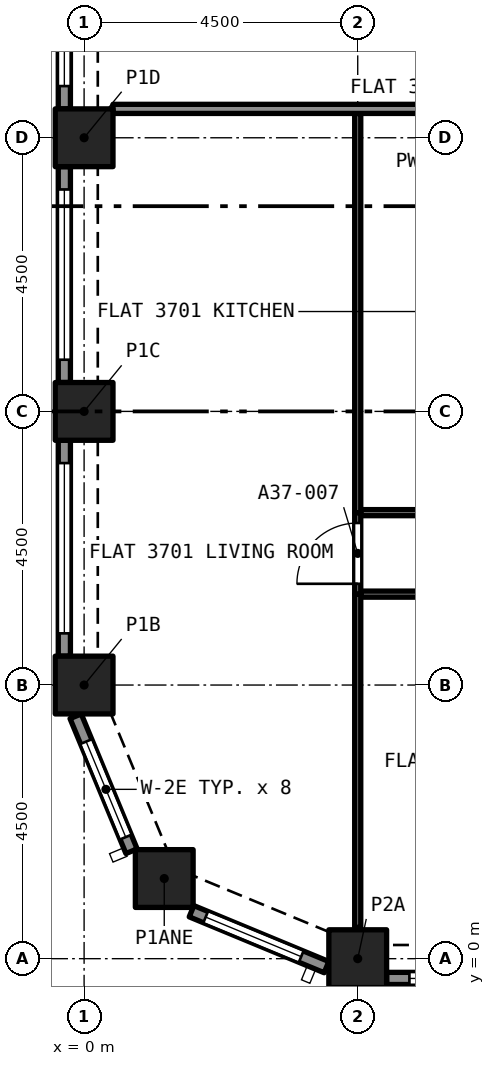
"""IFC4 building model, lengths in metres.
Left out: names, types, materials, properties, quantities, classifications, styles, units other than length and angle.
Written with IfcOpenShell. Run it as: python <this file> out.ifc"""

import sys

from ifc_helpers import new_model, si_unit, direction, frame, frame_2d, origin, origin_2d, place, context, subcontext, project, spatial, rectangle, extrude, element, fill, save


model = new_model("IFC4")
c1 = context("Model", 3, precision=1e-05, world=origin(), true_north=direction((0.0, 1.0)))
c2 = subcontext(c1, "Body", "Model", "MODEL_VIEW")
j1 = project(units=[si_unit("LENGTHUNIT", "METRE"), si_unit("PLANEANGLEUNIT", "RADIAN")], contexts=[c1])
p1 = place(None, origin())
s1 = spatial("IfcSite", under=j1, at=p1, CompositionType="ELEMENT")
p2 = place(p1, origin())
s2 = spatial("IfcBuilding", under=s1, at=p2, CompositionType="ELEMENT")
p3 = place(p2, frame((0.0, 0.0, 133.4)))
s3 = spatial("IfcBuildingStorey", under=s2, at=p3, CompositionType="ELEMENT", Elevation=133.4)
for number, where, z_axis, x_axis in (
    (1, (4.5, 0.0, 0.0), (0.0, 0.0, 1.0), (1.0, 0.0, 0.0)),
    (2, (1.318, 1.318, 0.0), (0.0, 0.0, 1.0), (1.0, 0.0, 0.0)),
    (3, (0.0, 4.5, 0.0), (0.0, 0.0, 1.0), (1.0, 0.0, 0.0)),
    (4, (0.0, 9.0, 0.0), (0.0, 0.0, 1.0), (1.0, 0.0, 0.0)),
    (5, (0.0, 13.5, 0.0), (0.0, 0.0, 1.0), (1.0, 0.0, 0.0)),
):
    element("IfcColumn", number, at=place(p3, frame(where, z_axis=z_axis, x_axis=x_axis)), inside=s3, PredefinedType="COLUMN", context=c2, shape_type="SweptSolid", body=[
        extrude(rectangle(XDim=0.95, YDim=0.95, at=origin_2d()), origin(), (0.0, 0.0, 1.0), 3.2),
    ])
p4 = place(p3, frame((0.78, 1.767, 0.0), z_axis=(0.0, 0.0, 1.0), x_axis=(-0.382680855588, 0.923880599843, 0.0)))
e6 = element("IfcWall", 6, at=p4, inside=s3, PredefinedType="SOLIDWALL", context=c2, shape_type="SweptSolid", body=[
    extrude(rectangle(XDim=2.403, YDim=0.2, at=frame_2d((1.201, 0.0))), origin(), (0.0, 0.0, 1.0), 3.2),
])
p5 = place(p4, frame((0.251, 0.0, 0.45)))
e7 = element("IfcOpeningElement", 7, at=p5, cuts=e6, PredefinedType="OPENING", context=c2, shape_type="SweptSolid", body=[
    extrude(rectangle(XDim=1.7, YDim=1.95, at=frame_2d((0.85, 0.975))), frame((0.0, 0.11, 0.0), z_axis=(0.0, -1.0, 0.0), x_axis=(1.0, 0.0, 0.0)), (0.0, 0.0, 1.0), 0.22),
])
p6 = place(p3, frame((3.987, -0.139, 0.0), z_axis=(0.0, 0.0, 1.0), x_axis=(-0.923880599843, 0.382680855588, 0.0)))
e8 = element("IfcWall", 8, at=p6, inside=s3, PredefinedType="SOLIDWALL", context=c2, shape_type="SweptSolid", body=[
    extrude(rectangle(XDim=2.403, YDim=0.2, at=frame_2d((1.201, 0.0))), origin(), (0.0, 0.0, 1.0), 3.2),
])
p7 = place(p6, frame((0.451, 0.0, 0.45)))
e9 = element("IfcOpeningElement", 9, at=p7, cuts=e8, PredefinedType="OPENING", context=c2, shape_type="SweptSolid", body=[
    extrude(rectangle(XDim=1.7, YDim=1.95, at=frame_2d((0.85, 0.975))), frame((0.0, 0.11, 0.0), z_axis=(0.0, -1.0, 0.0), x_axis=(1.0, 0.0, 0.0)), (0.0, 0.0, 1.0), 0.22),
])
p8 = place(p3, frame((8.525, -0.325, 0.0), z_axis=(0.0, 0.0, 1.0), x_axis=(-1.0, 0.0, 0.0)))
e10 = element("IfcWall", 10, at=p8, inside=s3, PredefinedType="SOLIDWALL", context=c2, shape_type="SweptSolid", body=[
    extrude(rectangle(XDim=3.55, YDim=0.2, at=frame_2d((1.775, 0.0))), origin(), (0.0, 0.0, 1.0), 3.2),
])
p9 = place(p8, frame((0.375, 0.0, 0.45)))
e11 = element("IfcOpeningElement", 11, at=p9, cuts=e10, PredefinedType="OPENING", context=c2, shape_type="SweptSolid", body=[
    extrude(rectangle(XDim=2.8, YDim=1.95, at=frame_2d((1.4, 0.975))), frame((0.0, 0.11, 0.0), z_axis=(0.0, -1.0, 0.0), x_axis=(1.0, 0.0, 0.0)), (0.0, 0.0, 1.0), 0.22),
])
p10 = place(p3, frame((-0.325, 13.975, 0.0), z_axis=(0.0, 0.0, 1.0), x_axis=(0.0, 1.0, 0.0)))
e12 = element("IfcWall", 12, at=p10, inside=s3, PredefinedType="SOLIDWALL", context=c2, shape_type="SweptSolid", body=[
    extrude(rectangle(XDim=3.55, YDim=0.2, at=frame_2d((1.775, 0.0))), origin(), (0.0, 0.0, 1.0), 3.2),
])
p11 = place(p10, frame((0.375, 0.0, 0.45)))
e13 = element("IfcOpeningElement", 13, at=p11, cuts=e12, PredefinedType="OPENING", context=c2, shape_type="SweptSolid", body=[
    extrude(rectangle(XDim=2.8, YDim=1.95, at=frame_2d((1.4, 0.975))), frame((0.0, 0.11, 0.0), z_axis=(0.0, -1.0, 0.0), x_axis=(1.0, 0.0, 0.0)), (0.0, 0.0, 1.0), 0.22),
])
p12 = place(p3, frame((-0.325, 9.475, 0.0), z_axis=(0.0, 0.0, 1.0), x_axis=(0.0, 1.0, 0.0)))
e14 = element("IfcWall", 14, at=p12, inside=s3, PredefinedType="SOLIDWALL", context=c2, shape_type="SweptSolid", body=[
    extrude(rectangle(XDim=3.55, YDim=0.2, at=frame_2d((1.775, 0.0))), origin(), (0.0, 0.0, 1.0), 3.2),
])
p13 = place(p12, frame((0.375, 0.0, 0.45)))
e15 = element("IfcOpeningElement", 15, at=p13, cuts=e14, PredefinedType="OPENING", context=c2, shape_type="SweptSolid", body=[
    extrude(rectangle(XDim=2.8, YDim=1.95, at=frame_2d((1.4, 0.975))), frame((0.0, 0.11, 0.0), z_axis=(0.0, -1.0, 0.0), x_axis=(1.0, 0.0, 0.0)), (0.0, 0.0, 1.0), 0.22),
])
p14 = place(p3, frame((-0.325, 4.975, 0.0), z_axis=(0.0, 0.0, 1.0), x_axis=(0.0, 1.0, 0.0)))
e16 = element("IfcWall", 16, at=p14, inside=s3, PredefinedType="SOLIDWALL", context=c2, shape_type="SweptSolid", body=[
    extrude(rectangle(XDim=3.55, YDim=0.2, at=frame_2d((1.775, 0.0))), origin(), (0.0, 0.0, 1.0), 3.2),
])
p15 = place(p14, frame((0.375, 0.0, 0.45)))
e17 = element("IfcOpeningElement", 17, at=p15, cuts=e16, PredefinedType="OPENING", context=c2, shape_type="SweptSolid", body=[
    extrude(rectangle(XDim=2.8, YDim=1.95, at=frame_2d((1.4, 0.975))), frame((0.0, 0.11, 0.0), z_axis=(0.0, -1.0, 0.0), x_axis=(1.0, 0.0, 0.0)), (0.0, 0.0, 1.0), 0.22),
])
p16 = place(p3, frame((9.0, 5.995, 0.0), z_axis=(0.0, 0.0, 1.0), x_axis=(-1.0, 0.0, 0.0)))
e18 = element("IfcWall", 18, at=p16, inside=s3, PredefinedType="PARTITIONING", context=c2, shape_type="SweptSolid", body=[
    extrude(rectangle(XDim=4.45, YDim=0.1, at=frame_2d((2.225, 0.0))), origin(), (0.0, 0.0, 1.0), 2.9),
])
p17 = place(p16, frame((1.8, 0.0, 0.0)))
e19 = element("IfcOpeningElement", 19, at=p17, cuts=e18, PredefinedType="OPENING", context=c2, shape_type="SweptSolid", body=[
    extrude(rectangle(XDim=0.9, YDim=2.1, at=frame_2d((0.45, 1.05))), frame((0.0, 0.06, 0.0), z_axis=(0.0, -1.0, 0.0), x_axis=(1.0, 0.0, 0.0)), (0.0, 0.0, 1.0), 0.12),
])
p18 = place(p3, frame((4.5, 0.514, 0.0), z_axis=(0.0, 0.0, 1.0), x_axis=(0.0, 1.0, 0.0)))
e20 = element("IfcWall", 20, at=p18, inside=s3, PredefinedType="PARTITIONING", context=c2, shape_type="SweptSolid", body=[
    extrude(rectangle(XDim=5.481, YDim=0.1, at=frame_2d((2.74, 0.0))), origin(), (0.0, 0.0, 1.0), 2.9),
])
p19 = place(p3, frame((4.55, 7.335, 0.0), z_axis=(0.0, 0.0, 1.0), x_axis=(1.0, 0.0, 0.0)))
e21 = element("IfcWall", 21, at=p19, inside=s3, PredefinedType="PARTITIONING", context=c2, shape_type="SweptSolid", body=[
    extrude(rectangle(XDim=3.12, YDim=0.1, at=frame_2d((1.56, 0.0))), origin(), (0.0, 0.0, 1.0), 2.9),
])
p20 = place(p19, frame((1.085, 0.0, 0.0)))
e22 = element("IfcOpeningElement", 22, at=p20, cuts=e21, PredefinedType="OPENING", context=c2, shape_type="SweptSolid", body=[
    extrude(rectangle(XDim=0.9, YDim=2.1, at=frame_2d((0.45, 1.05))), frame((0.0, 0.06, 0.0), z_axis=(0.0, -1.0, 0.0), x_axis=(1.0, 0.0, 0.0)), (0.0, 0.0, 1.0), 0.12),
])
p21 = place(p3, frame((4.5, 5.995, 0.0), z_axis=(0.0, 0.0, 1.0), x_axis=(0.0, 1.0, 0.0)))
e23 = element("IfcWall", 23, at=p21, inside=s3, PredefinedType="PARTITIONING", context=c2, shape_type="SweptSolid", body=[
    extrude(rectangle(XDim=1.34, YDim=0.1, at=frame_2d((0.67, 0.0))), origin(), (0.0, 0.0, 1.0), 2.9),
])
p22 = place(p21, frame((0.17, 0.0, 0.0)))
e24 = element("IfcOpeningElement", 24, at=p22, cuts=e23, PredefinedType="OPENING", context=c2, shape_type="SweptSolid", body=[
    extrude(rectangle(XDim=1.0, YDim=2.1, at=frame_2d((0.5, 1.05))), frame((0.0, 0.06, 0.0), z_axis=(0.0, -1.0, 0.0), x_axis=(1.0, 0.0, 0.0)), (0.0, 0.0, 1.0), 0.12),
])
p23 = place(p3, frame((4.5, 7.335, 0.0), z_axis=(0.0, 0.0, 1.0), x_axis=(0.0, 1.0, 0.0)))
e25 = element("IfcWall", 25, at=p23, inside=s3, PredefinedType="PARTITIONING", context=c2, shape_type="SweptSolid", body=[
    extrude(rectangle(XDim=6.565, YDim=0.1, at=frame_2d((3.282, 0.0))), origin(), (0.0, 0.0, 1.0), 2.9),
])
p24 = place(p3, frame((0.475, 13.975, 0.0), z_axis=(0.0, 0.0, 1.0), x_axis=(1.0, 0.0, 0.0)))
e26 = element("IfcWall", 26, at=p24, inside=s3, PredefinedType="PARTITIONING", context=c2, shape_type="SweptSolid", body=[
    extrude(rectangle(XDim=13.55, YDim=0.15, at=frame_2d((6.775, 0.0))), origin(), (0.0, 0.0, 1.0), 2.9),
])
p25 = place(p5, origin())
e27 = element("IfcWindow", 27, at=p25, inside=s3, PartitioningType="SINGLE_PANEL", PredefinedType="WINDOW", context=c2, shape_type="SweptSolid", body=[
    extrude(rectangle(XDim=1.7, YDim=1.95, at=frame_2d((0.85, 0.975))), frame((0.0, 0.03, 0.0), z_axis=(0.0, -1.0, 0.0), x_axis=(1.0, 0.0, 0.0)), (0.0, 0.0, 1.0), 0.06),
])
fill(e7, e27)
p26 = place(p7, origin())
e28 = element("IfcWindow", 28, at=p26, inside=s3, PartitioningType="SINGLE_PANEL", PredefinedType="WINDOW", context=c2, shape_type="SweptSolid", body=[
    extrude(rectangle(XDim=1.7, YDim=1.95, at=frame_2d((0.85, 0.975))), frame((0.0, 0.03, 0.0), z_axis=(0.0, -1.0, 0.0), x_axis=(1.0, 0.0, 0.0)), (0.0, 0.0, 1.0), 0.06),
])
fill(e9, e28)
p27 = place(p9, origin())
e29 = element("IfcWindow", 29, at=p27, inside=s3, PartitioningType="SINGLE_PANEL", PredefinedType="WINDOW", context=c2, shape_type="SweptSolid", body=[
    extrude(rectangle(XDim=2.8, YDim=1.95, at=frame_2d((1.4, 0.975))), frame((0.0, 0.03, 0.0), z_axis=(0.0, -1.0, 0.0), x_axis=(1.0, 0.0, 0.0)), (0.0, 0.0, 1.0), 0.06),
])
fill(e11, e29)
p28 = place(p11, origin())
e30 = element("IfcWindow", 30, at=p28, inside=s3, PartitioningType="SINGLE_PANEL", PredefinedType="WINDOW", context=c2, shape_type="SweptSolid", body=[
    extrude(rectangle(XDim=2.8, YDim=1.95, at=frame_2d((1.4, 0.975))), frame((0.0, 0.03, 0.0), z_axis=(0.0, -1.0, 0.0), x_axis=(1.0, 0.0, 0.0)), (0.0, 0.0, 1.0), 0.06),
])
fill(e13, e30)
p29 = place(p13, origin())
e31 = element("IfcWindow", 31, at=p29, inside=s3, PartitioningType="SINGLE_PANEL", PredefinedType="WINDOW", context=c2, shape_type="SweptSolid", body=[
    extrude(rectangle(XDim=2.8, YDim=1.95, at=frame_2d((1.4, 0.975))), frame((0.0, 0.03, 0.0), z_axis=(0.0, -1.0, 0.0), x_axis=(1.0, 0.0, 0.0)), (0.0, 0.0, 1.0), 0.06),
])
fill(e15, e31)
p30 = place(p15, origin())
e32 = element("IfcWindow", 32, at=p30, inside=s3, PartitioningType="SINGLE_PANEL", PredefinedType="WINDOW", context=c2, shape_type="SweptSolid", body=[
    extrude(rectangle(XDim=2.8, YDim=1.95, at=frame_2d((1.4, 0.975))), frame((0.0, 0.03, 0.0), z_axis=(0.0, -1.0, 0.0), x_axis=(1.0, 0.0, 0.0)), (0.0, 0.0, 1.0), 0.06),
])
fill(e17, e32)
p31 = place(p22, origin())
e33 = element("IfcDoor", 33, at=p31, inside=s3, OperationType="SINGLE_SWING_LEFT", PredefinedType="DOOR", context=c2, shape_type="SweptSolid", body=[
    extrude(rectangle(XDim=1.0, YDim=2.1, at=frame_2d((0.5, 1.05))), frame((0.0, 0.025, 0.0), z_axis=(0.0, -1.0, 0.0), x_axis=(1.0, 0.0, 0.0)), (0.0, 0.0, 1.0), 0.05),
])
fill(e24, e33)
save(model, sys.argv[1])
